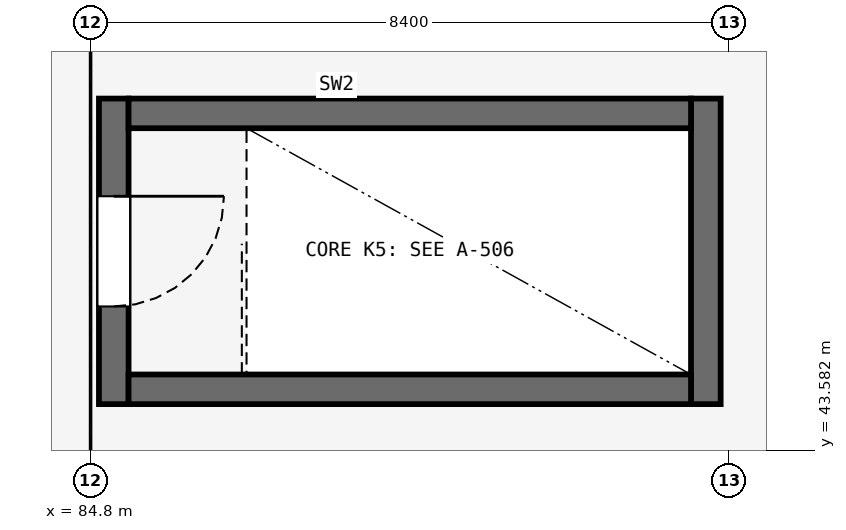
"""IFC4 building model, lengths in metres.
Left out: names, types, materials, properties, quantities, classifications, styles, units other than length and angle.
Written with IfcOpenShell. Run it as: python <this file> out.ifc"""

import sys

from ifc_helpers import new_model, si_unit, direction, frame, frame_2d, origin, place, context, subcontext, project, spatial, rectangle, extrude, element, fill, save


model = new_model("IFC4")
c1 = context("Model", 3, precision=1e-05, world=origin(), true_north=direction((0.0, 1.0)))
c2 = subcontext(c1, "Body", "Model", "MODEL_VIEW")
j1 = project(units=[si_unit("LENGTHUNIT", "METRE"), si_unit("PLANEANGLEUNIT", "RADIAN")], contexts=[c1])
p1 = place(None, origin())
s1 = spatial("IfcSite", under=j1, at=p1, CompositionType="ELEMENT")
p2 = place(p1, origin())
s2 = spatial("IfcBuilding", under=s1, at=p2, CompositionType="ELEMENT")
p3 = place(p2, frame((0.0, 0.0, 9.9)))
s3 = spatial("IfcBuildingStorey", under=s2, at=p3, CompositionType="ELEMENT", Elevation=9.9)
p4 = place(p3, frame((85.105, 48.21, 0.0), z_axis=(0.0, 0.0, 1.0), x_axis=(0.0, -1.0, 0.0)))
e1 = element("IfcWall", 1, at=p4, inside=s3, PredefinedType="SHEAR", context=c2, shape_type="SweptSolid", body=[
    extrude(rectangle(XDim=4.02, YDim=0.39, at=frame_2d((2.01, 0.0))), origin(), (0.0, 0.0, 1.0), 4.24),
])
p5 = place(p4, frame((1.285, 0.0, 0.0)))
e2 = element("IfcOpeningElement", 2, at=p5, cuts=e1, PredefinedType="OPENING", context=c2, shape_type="SweptSolid", body=[
    extrude(rectangle(XDim=1.45, YDim=2.2, at=frame_2d((0.725, 1.1))), frame((0.0, 0.205, 0.0), z_axis=(0.0, -1.0, 0.0), x_axis=(1.0, 0.0, 0.0)), (0.0, 0.0, 1.0), 0.41),
])
p6 = place(p3, frame((92.895, 44.19, 0.0), z_axis=(0.0, 0.0, 1.0), x_axis=(0.0, 1.0, 0.0)))
e3 = element("IfcWall", 3, at=p6, inside=s3, PredefinedType="SHEAR", context=c2, shape_type="SweptSolid", body=[
    extrude(rectangle(XDim=4.02, YDim=0.39, at=frame_2d((2.01, 0.0))), origin(), (0.0, 0.0, 1.0), 4.24),
])
for number, where, z_axis, x_axis in (
    (4, (85.3, 44.385, 0.0), (0.0, 0.0, 1.0), (1.0, 0.0, 0.0)),
    (5, (85.3, 48.015, 0.0), (0.0, 0.0, 1.0), (1.0, 0.0, 0.0)),
):
    element("IfcWall", number, at=place(p3, frame(where, z_axis=z_axis, x_axis=x_axis)), inside=s3, PredefinedType="SHEAR", context=c2, shape_type="SweptSolid", body=[
        extrude(rectangle(XDim=7.4, YDim=0.39, at=frame_2d((3.7, 0.0))), origin(), (0.0, 0.0, 1.0), 4.24),
    ])
p7 = place(p5, origin())
e6 = element("IfcDoor", 6, at=p7, inside=s3, OperationType="SINGLE_SWING_LEFT", PredefinedType="DOOR", context=c2, shape_type="SweptSolid", body=[
    extrude(rectangle(XDim=1.45, YDim=2.2, at=frame_2d((0.725, 1.1))), frame((0.0, 0.025, 0.0), z_axis=(0.0, -1.0, 0.0), x_axis=(1.0, 0.0, 0.0)), (0.0, 0.0, 1.0), 0.05),
])
fill(e2, e6)
save(model, sys.argv[1])
